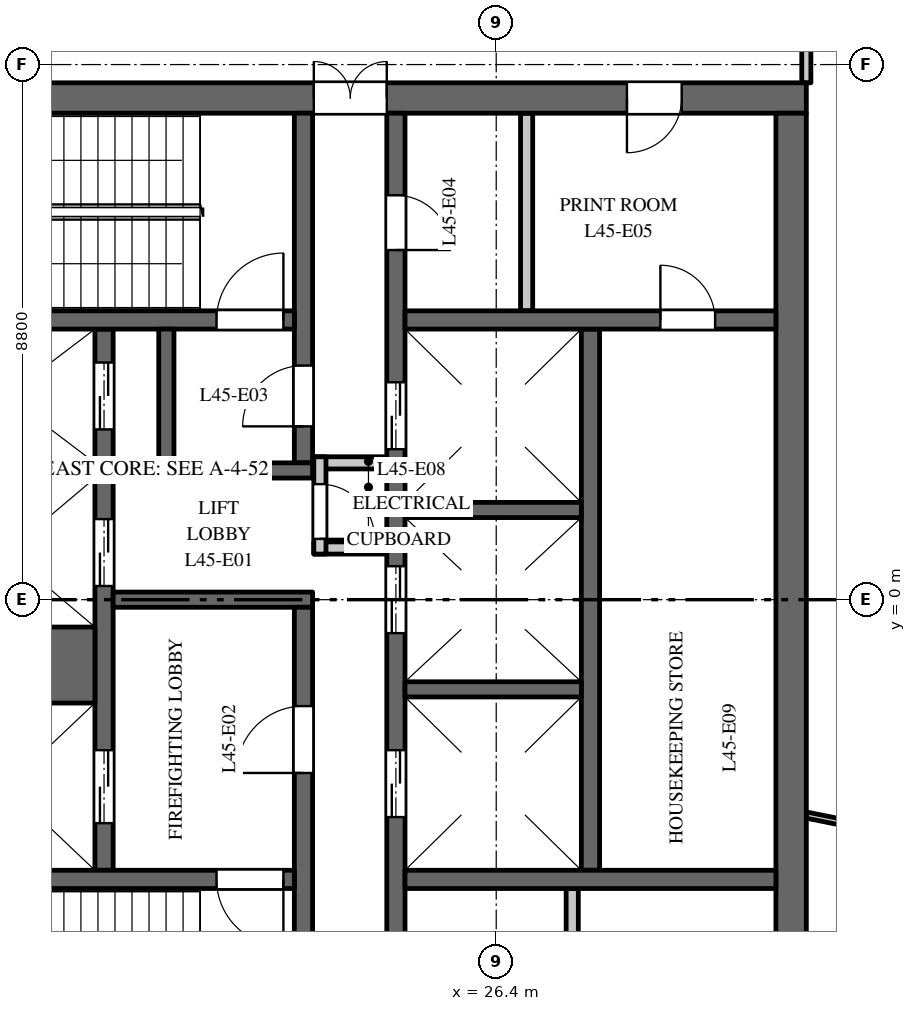
"""IFC4 building model, lengths in metres.
Left out: names, types, materials, properties, quantities, classifications, styles, units other than length and angle.
Written with IfcOpenShell. Run it as: python <this file> out.ifc"""

import sys

from ifc_helpers import new_model, si_unit, direction, frame, frame_2d, origin, place, context, subcontext, project, spatial, rectangle, extrude, element, fill, save


model = new_model("IFC4")
c1 = context("Model", 3, precision=1e-05, world=origin(), true_north=direction((0.0, 1.0)))
c2 = subcontext(c1, "Body", "Model", "MODEL_VIEW")
j1 = project(units=[si_unit("LENGTHUNIT", "METRE"), si_unit("PLANEANGLEUNIT", "RADIAN")], contexts=[c1])
p1 = place(None, origin())
s1 = spatial("IfcSite", under=j1, at=p1, CompositionType="ELEMENT")
p2 = place(p1, origin())
s2 = spatial("IfcBuilding", under=s1, at=p2, CompositionType="ELEMENT")
p3 = place(p2, frame((0.0, 0.0, 194.0)))
s3 = spatial("IfcBuildingStorey", under=s2, at=p3, CompositionType="ELEMENT", Elevation=194.0)
p4 = place(p3, frame((16.5, 8.25, 0.0), z_axis=(0.0, 0.0, 1.0), x_axis=(1.0, 0.0, 0.0)))
e1 = element("IfcWall", 1, at=p4, inside=s3, PredefinedType="SHEAR", context=c2, shape_type="SweptSolid", body=[
    extrude(rectangle(XDim=15.0, YDim=0.5, at=frame_2d((7.5, 0.0))), origin(), (0.0, 0.0, 1.0), 3.7),
])
p5 = place(p4, frame((6.9, 0.0, 0.0)))
e2 = element("IfcOpeningElement", 2, at=p5, cuts=e1, PredefinedType="OPENING", context=c2, shape_type="SweptSolid", body=[
    extrude(rectangle(XDim=1.2, YDim=2.1, at=frame_2d((0.6, 1.05))), frame((0.0, 0.26, 0.0), z_axis=(0.0, -1.0, 0.0), x_axis=(1.0, 0.0, 0.0)), (0.0, 0.0, 1.0), 0.52),
])
p6 = place(p4, frame((12.05, 0.0, 0.0)))
e3 = element("IfcOpeningElement", 3, at=p6, cuts=e1, PredefinedType="OPENING", context=c2, shape_type="SweptSolid", body=[
    extrude(rectangle(XDim=0.9, YDim=2.1, at=frame_2d((0.45, 1.05))), frame((0.0, 0.26, 0.0), z_axis=(0.0, -1.0, 0.0), x_axis=(1.0, 0.0, 0.0)), (0.0, 0.0, 1.0), 0.52),
])
p7 = place(p3, frame((27.95, -4.45, 0.0), z_axis=(0.0, 0.0, 1.0), x_axis=(0.0, 1.0, 0.0)))
e4 = element("IfcWall", 4, at=p7, inside=s3, PredefinedType="SHEAR", context=c2, shape_type="SweptSolid", body=[
    extrude(rectangle(XDim=8.9, YDim=0.3, at=frame_2d((4.45, 0.0))), origin(), (0.0, 0.0, 1.0), 3.7),
])
p8 = place(p3, frame((19.95, -4.45, 0.0), z_axis=(0.0, 0.0, 1.0), x_axis=(0.0, 1.0, 0.0)))
e5 = element("IfcWall", 5, at=p8, inside=s3, PredefinedType="SHEAR", context=c2, shape_type="SweptSolid", body=[
    extrude(rectangle(XDim=8.9, YDim=0.3, at=frame_2d((4.45, 0.0))), origin(), (0.0, 0.0, 1.0), 3.7),
])
p9 = place(p8, frame((0.775, 0.0, 0.0)))
e6 = element("IfcOpeningElement", 6, at=p9, cuts=e5, PredefinedType="OPENING", context=c2, shape_type="SweptSolid", body=[
    extrude(rectangle(XDim=1.2, YDim=2.1, at=frame_2d((0.6, 1.05))), frame((0.0, 0.16, 0.0), z_axis=(0.0, -1.0, 0.0), x_axis=(1.0, 0.0, 0.0)), (0.0, 0.0, 1.0), 0.32),
])
p10 = place(p8, frame((4.675, 0.0, 0.0)))
e7 = element("IfcOpeningElement", 7, at=p10, cuts=e5, PredefinedType="OPENING", context=c2, shape_type="SweptSolid", body=[
    extrude(rectangle(XDim=1.1, YDim=2.1, at=frame_2d((0.55, 1.05))), frame((0.0, 0.16, 0.0), z_axis=(0.0, -1.0, 0.0), x_axis=(1.0, 0.0, 0.0)), (0.0, 0.0, 1.0), 0.32),
])
p11 = place(p8, frame((7.25, 0.0, 0.0)))
e8 = element("IfcOpeningElement", 8, at=p11, cuts=e5, PredefinedType="OPENING", context=c2, shape_type="SweptSolid", body=[
    extrude(rectangle(XDim=1.1, YDim=2.1, at=frame_2d((0.55, 1.05))), frame((0.0, 0.16, 0.0), z_axis=(0.0, -1.0, 0.0), x_axis=(1.0, 0.0, 0.0)), (0.0, 0.0, 1.0), 0.32),
])
p12 = place(p3, frame((24.75, -8.0, 0.0), z_axis=(0.0, 0.0, 1.0), x_axis=(0.0, 1.0, 0.0)))
e9 = element("IfcWall", 9, at=p12, inside=s3, PredefinedType="SHEAR", context=c2, shape_type="SweptSolid", body=[
    extrude(rectangle(XDim=16.0, YDim=0.3, at=frame_2d((8.0, 0.0))), origin(), (0.0, 0.0, 1.0), 3.7),
])
p13 = place(p12, frame((4.425, 0.0, 0.0)))
e10 = element("IfcOpeningElement", 10, at=p13, cuts=e9, PredefinedType="OPENING", context=c2, shape_type="SweptSolid", body=[
    extrude(rectangle(XDim=1.1, YDim=2.1, at=frame_2d((0.55, 1.05))), frame((0.0, 0.16, 0.0), z_axis=(0.0, -1.0, 0.0), x_axis=(1.0, 0.0, 0.0)), (0.0, 0.0, 1.0), 0.32),
])
p14 = place(p12, frame((7.45, 0.0, 0.0)))
e11 = element("IfcOpeningElement", 11, at=p14, cuts=e9, PredefinedType="OPENING", context=c2, shape_type="SweptSolid", body=[
    extrude(rectangle(XDim=1.1, YDim=2.1, at=frame_2d((0.55, 1.05))), frame((0.0, 0.16, 0.0), z_axis=(0.0, -1.0, 0.0), x_axis=(1.0, 0.0, 0.0)), (0.0, 0.0, 1.0), 0.32),
])
p15 = place(p12, frame((10.475, 0.0, 0.0)))
e12 = element("IfcOpeningElement", 12, at=p15, cuts=e9, PredefinedType="OPENING", context=c2, shape_type="SweptSolid", body=[
    extrude(rectangle(XDim=1.1, YDim=2.1, at=frame_2d((0.55, 1.05))), frame((0.0, 0.16, 0.0), z_axis=(0.0, -1.0, 0.0), x_axis=(1.0, 0.0, 0.0)), (0.0, 0.0, 1.0), 0.32),
])
p16 = place(p12, frame((13.75, 0.0, 0.0)))
e13 = element("IfcOpeningElement", 13, at=p16, cuts=e9, PredefinedType="OPENING", context=c2, shape_type="SweptSolid", body=[
    extrude(rectangle(XDim=0.9, YDim=2.1, at=frame_2d((0.45, 1.05))), frame((0.0, 0.16, 0.0), z_axis=(0.0, -1.0, 0.0), x_axis=(1.0, 0.0, 0.0)), (0.0, 0.0, 1.0), 0.32),
])
p17 = place(p12, frame((1.35, 0.0, 0.0)))
e14 = element("IfcOpeningElement", 14, at=p17, cuts=e9, PredefinedType="OPENING", context=c2, shape_type="SweptSolid", body=[
    extrude(rectangle(XDim=0.9, YDim=2.1, at=frame_2d((0.45, 1.05))), frame((0.0, 0.16, 0.0), z_axis=(0.0, -1.0, 0.0), x_axis=(1.0, 0.0, 0.0)), (0.0, 0.0, 1.0), 0.32),
])
p18 = place(p3, frame((20.1, 0.0, 0.0), z_axis=(0.0, 0.0, 1.0), x_axis=(1.0, 0.0, 0.0)))
e15 = element("IfcWall", 15, at=p18, inside=s3, PredefinedType="SHEAR", context=c2, shape_type="SweptSolid", body=[
    extrude(rectangle(XDim=3.28, YDim=0.25, at=frame_2d((1.64, 0.0))), origin(), (0.0, 0.0, 1.0), 3.7),
])
for number, where, z_axis, x_axis in (
    (16, (23.4, 0.85, 0.0), (0.0, 0.0, 1.0), (1.0, 0.0, 0.0)),
    (17, (23.4, 2.25, 0.0), (0.0, 0.0, 1.0), (1.0, 0.0, 0.0)),
):
    element("IfcWall", number, at=place(p3, frame(where, z_axis=z_axis, x_axis=x_axis)), inside=s3, PredefinedType="PARTITIONING", context=c2, shape_type="SweptSolid", body=[
        extrude(rectangle(XDim=1.2, YDim=0.2, at=frame_2d((0.6, 0.0))), origin(), (0.0, 0.0, 1.0), 3.7),
    ])
p19 = place(p3, frame((23.5, 0.75, 0.0), z_axis=(0.0, 0.0, 1.0), x_axis=(0.0, 1.0, 0.0)))
e18 = element("IfcWall", 18, at=p19, inside=s3, PredefinedType="PARTITIONING", context=c2, shape_type="SweptSolid", body=[
    extrude(rectangle(XDim=1.6, YDim=0.2, at=frame_2d((0.8, 0.0))), origin(), (0.0, 0.0, 1.0), 3.7),
])
p20 = place(p19, frame((0.25, 0.0, 0.0)))
e19 = element("IfcOpeningElement", 19, at=p20, cuts=e18, PredefinedType="OPENING", context=c2, shape_type="SweptSolid", body=[
    extrude(rectangle(XDim=0.9, YDim=2.1, at=frame_2d((0.45, 1.05))), frame((0.0, 0.11, 0.0), z_axis=(0.0, -1.0, 0.0), x_axis=(1.0, 0.0, 0.0)), (0.0, 0.0, 1.0), 0.22),
])
p21 = place(p3, frame((31.25, -8.0, 0.0), z_axis=(0.0, 0.0, 1.0), x_axis=(0.0, 1.0, 0.0)))
e20 = element("IfcWall", 20, at=p21, inside=s3, PredefinedType="SHEAR", context=c2, shape_type="SweptSolid", body=[
    extrude(rectangle(XDim=16.0, YDim=0.5, at=frame_2d((8.0, 0.0))), origin(), (0.0, 0.0, 1.0), 3.7),
])
p22 = place(p3, frame((24.9, 4.6, 0.0), z_axis=(0.0, 0.0, 1.0), x_axis=(1.0, 0.0, 0.0)))
e21 = element("IfcWall", 21, at=p22, inside=s3, PredefinedType="SHEAR", context=c2, shape_type="SweptSolid", body=[
    extrude(rectangle(XDim=6.1, YDim=0.3, at=frame_2d((3.05, 0.0))), origin(), (0.0, 0.0, 1.0), 3.7),
])
p23 = place(p22, frame((4.2, 0.0, 0.0)))
e22 = element("IfcOpeningElement", 22, at=p23, cuts=e21, PredefinedType="OPENING", context=c2, shape_type="SweptSolid", body=[
    extrude(rectangle(XDim=0.9, YDim=2.1, at=frame_2d((0.45, 1.05))), frame((0.0, 0.16, 0.0), z_axis=(0.0, -1.0, 0.0), x_axis=(1.0, 0.0, 0.0)), (0.0, 0.0, 1.0), 0.32),
])
for number, where, z_axis, x_axis in (
    (23, (26.9, 4.75, 0.0), (0.0, 0.0, 1.0), (0.0, 1.0, 0.0)),
    (24, (27.65, -8.0, 0.0), (0.0, 0.0, 1.0), (0.0, 1.0, 0.0)),
):
    element("IfcWall", number, at=place(p3, frame(where, z_axis=z_axis, x_axis=x_axis)), inside=s3, PredefinedType="PARTITIONING", context=c2, shape_type="SweptSolid", body=[
        extrude(rectangle(XDim=3.25, YDim=0.2, at=frame_2d((1.625, 0.0))), origin(), (0.0, 0.0, 1.0), 3.7),
    ])
p24 = place(p3, frame((24.9, -4.6, 0.0), z_axis=(0.0, 0.0, 1.0), x_axis=(1.0, 0.0, 0.0)))
e25 = element("IfcWall", 25, at=p24, inside=s3, PredefinedType="SHEAR", context=c2, shape_type="SweptSolid", body=[
    extrude(rectangle(XDim=6.1, YDim=0.3, at=frame_2d((3.05, 0.0))), origin(), (0.0, 0.0, 1.0), 3.7),
])
p25 = place(p3, frame((16.9, -1.075, 0.0), z_axis=(0.0, 0.0, 1.0), x_axis=(1.0, 0.0, 0.0)))
e26 = element("IfcWall", 26, at=p25, inside=s3, PredefinedType="SHEAR", context=c2, shape_type="SweptSolid", body=[
    extrude(rectangle(XDim=2.9, YDim=1.25, at=frame_2d((1.45, 0.0))), origin(), (0.0, 0.0, 1.0), 3.7),
])
for number, where, z_axis, x_axis in (
    (27, (16.9, 2.125, 0.0), (0.0, 0.0, 1.0), (1.0, 0.0, 0.0)),
    (28, (24.9, -1.475, 0.0), (0.0, 0.0, 1.0), (1.0, 0.0, 0.0)),
    (29, (24.9, 1.475, 0.0), (0.0, 0.0, 1.0), (1.0, 0.0, 0.0)),
):
    element("IfcWall", number, at=place(p3, frame(where, z_axis=z_axis, x_axis=x_axis)), inside=s3, PredefinedType="SHEAR", context=c2, shape_type="SweptSolid", body=[
        extrude(rectangle(XDim=2.9, YDim=0.25, at=frame_2d((1.45, 0.0))), origin(), (0.0, 0.0, 1.0), 3.7),
    ])
p26 = place(p3, frame((23.23, 2.25, 0.0), z_axis=(0.0, 0.0, 1.0), x_axis=(0.0, 1.0, 0.0)))
e30 = element("IfcWall", 30, at=p26, inside=s3, PredefinedType="SHEAR", context=c2, shape_type="SweptSolid", body=[
    extrude(rectangle(XDim=5.75, YDim=0.3, at=frame_2d((2.875, 0.0))), origin(), (0.0, 0.0, 1.0), 3.7),
])
p27 = place(p26, frame((0.6, 0.0, 0.0)))
e31 = element("IfcOpeningElement", 31, at=p27, cuts=e30, PredefinedType="OPENING", context=c2, shape_type="SweptSolid", body=[
    extrude(rectangle(XDim=1.0, YDim=2.1, at=frame_2d((0.5, 1.05))), frame((0.0, 0.16, 0.0), z_axis=(0.0, -1.0, 0.0), x_axis=(1.0, 0.0, 0.0)), (0.0, 0.0, 1.0), 0.32),
])
p28 = place(p3, frame((23.23, -8.0, 0.0), z_axis=(0.0, 0.0, 1.0), x_axis=(0.0, 1.0, 0.0)))
e32 = element("IfcWall", 32, at=p28, inside=s3, PredefinedType="SHEAR", context=c2, shape_type="SweptSolid", body=[
    extrude(rectangle(XDim=7.875, YDim=0.3, at=frame_2d((3.938, 0.0))), origin(), (0.0, 0.0, 1.0), 3.7),
])
p29 = place(p28, frame((5.15, 0.0, 0.0)))
e33 = element("IfcOpeningElement", 33, at=p29, cuts=e32, PredefinedType="OPENING", context=c2, shape_type="SweptSolid", body=[
    extrude(rectangle(XDim=1.1, YDim=2.1, at=frame_2d((0.55, 1.05))), frame((0.0, 0.16, 0.0), z_axis=(0.0, -1.0, 0.0), x_axis=(1.0, 0.0, 0.0)), (0.0, 0.0, 1.0), 0.32),
])
p30 = place(p3, frame((16.9, 4.6, 0.0), z_axis=(0.0, 0.0, 1.0), x_axis=(1.0, 0.0, 0.0)))
e34 = element("IfcWall", 34, at=p30, inside=s3, PredefinedType="SHEAR", context=c2, shape_type="SweptSolid", body=[
    extrude(rectangle(XDim=6.18, YDim=0.3, at=frame_2d((3.09, 0.0))), origin(), (0.0, 0.0, 1.0), 3.7),
])
p31 = place(p30, frame((4.9, 0.0, 0.0)))
e35 = element("IfcOpeningElement", 35, at=p31, cuts=e34, PredefinedType="OPENING", context=c2, shape_type="SweptSolid", body=[
    extrude(rectangle(XDim=1.1, YDim=2.1, at=frame_2d((0.55, 1.05))), frame((0.0, 0.16, 0.0), z_axis=(0.0, -1.0, 0.0), x_axis=(1.0, 0.0, 0.0)), (0.0, 0.0, 1.0), 0.32),
])
p32 = place(p3, frame((16.9, -4.6, 0.0), z_axis=(0.0, 0.0, 1.0), x_axis=(1.0, 0.0, 0.0)))
e36 = element("IfcWall", 36, at=p32, inside=s3, PredefinedType="SHEAR", context=c2, shape_type="SweptSolid", body=[
    extrude(rectangle(XDim=6.18, YDim=0.3, at=frame_2d((3.09, 0.0))), origin(), (0.0, 0.0, 1.0), 3.7),
])
p33 = place(p32, frame((4.9, 0.0, 0.0)))
e37 = element("IfcOpeningElement", 37, at=p33, cuts=e36, PredefinedType="OPENING", context=c2, shape_type="SweptSolid", body=[
    extrude(rectangle(XDim=1.1, YDim=2.1, at=frame_2d((0.55, 1.05))), frame((0.0, 0.16, 0.0), z_axis=(0.0, -1.0, 0.0), x_axis=(1.0, 0.0, 0.0)), (0.0, 0.0, 1.0), 0.32),
])
p34 = place(p3, frame((20.85, 2.125, 0.0), z_axis=(0.0, 0.0, 1.0), x_axis=(1.0, 0.0, 0.0)))
e38 = element("IfcWall", 38, at=p34, inside=s3, PredefinedType="SHEAR", context=c2, shape_type="SweptSolid", body=[
    extrude(rectangle(XDim=2.53, YDim=0.25, at=frame_2d((1.265, 0.0))), origin(), (0.0, 0.0, 1.0), 3.7),
])
p35 = place(p3, frame((20.975, 2.25, 0.0), z_axis=(0.0, 0.0, 1.0), x_axis=(0.0, 1.0, 0.0)))
e39 = element("IfcWall", 39, at=p35, inside=s3, PredefinedType="SHEAR", context=c2, shape_type="SweptSolid", body=[
    extrude(rectangle(XDim=2.2, YDim=0.25, at=frame_2d((1.1, 0.0))), origin(), (0.0, 0.0, 1.0), 3.7),
])
p36 = place(p3, frame((31.5, -3.542, 0.0), z_axis=(0.0, 0.0, 1.0), x_axis=(0.980357474535, -0.197228857227, 0.0)))
e40 = element("IfcWall", 40, at=p36, inside=s3, PredefinedType="PARTITIONING", context=c2, shape_type="SweptSolid", body=[
    extrude(rectangle(XDim=4.092, YDim=0.1, at=frame_2d((2.046, 0.0))), origin(), (0.0, 0.0, 1.0), 2.9),
])
p37 = place(p3, frame((31.5, 8.5, 0.0), z_axis=(0.0, 0.0, 1.0), x_axis=(0.0, 1.0, 0.0)))
e41 = element("IfcWall", 41, at=p37, inside=s3, PredefinedType="PARTITIONING", context=c2, shape_type="SweptSolid", body=[
    extrude(rectangle(XDim=2.2, YDim=0.15, at=frame_2d((1.1, 0.0))), origin(), (0.0, 0.0, 1.0), 2.9),
])
p38 = place(p37, frame((0.65, 0.0, 0.0)))
e42 = element("IfcOpeningElement", 42, at=p38, cuts=e41, PredefinedType="OPENING", context=c2, shape_type="SweptSolid", body=[
    extrude(rectangle(XDim=1.0, YDim=2.1, at=frame_2d((0.5, 1.05))), frame((0.0, 0.085, 0.0), z_axis=(0.0, -1.0, 0.0), x_axis=(1.0, 0.0, 0.0)), (0.0, 0.0, 1.0), 0.17),
])
p39 = place(p9, origin())
e43 = element("IfcDoor", 43, at=p39, inside=s3, OperationType="DOUBLE_DOOR_SLIDING", PredefinedType="DOOR", context=c2, shape_type="SweptSolid", body=[
    extrude(rectangle(XDim=1.2, YDim=2.1, at=frame_2d((0.6, 1.05))), frame((0.0, 0.025, 0.0), z_axis=(0.0, -1.0, 0.0), x_axis=(1.0, 0.0, 0.0)), (0.0, 0.0, 1.0), 0.05),
])
fill(e6, e43)
p40 = place(p10, origin())
e44 = element("IfcDoor", 44, at=p40, inside=s3, OperationType="DOUBLE_DOOR_SLIDING", PredefinedType="DOOR", context=c2, shape_type="SweptSolid", body=[
    extrude(rectangle(XDim=1.1, YDim=2.1, at=frame_2d((0.55, 1.05))), frame((0.0, 0.025, 0.0), z_axis=(0.0, -1.0, 0.0), x_axis=(1.0, 0.0, 0.0)), (0.0, 0.0, 1.0), 0.05),
])
fill(e7, e44)
p41 = place(p11, origin())
e45 = element("IfcDoor", 45, at=p41, inside=s3, OperationType="DOUBLE_DOOR_SLIDING", PredefinedType="DOOR", context=c2, shape_type="SweptSolid", body=[
    extrude(rectangle(XDim=1.1, YDim=2.1, at=frame_2d((0.55, 1.05))), frame((0.0, 0.025, 0.0), z_axis=(0.0, -1.0, 0.0), x_axis=(1.0, 0.0, 0.0)), (0.0, 0.0, 1.0), 0.05),
])
fill(e8, e45)
p42 = place(p13, origin())
e46 = element("IfcDoor", 46, at=p42, inside=s3, OperationType="DOUBLE_DOOR_SLIDING", PredefinedType="DOOR", context=c2, shape_type="SweptSolid", body=[
    extrude(rectangle(XDim=1.1, YDim=2.1, at=frame_2d((0.55, 1.05))), frame((0.0, 0.025, 0.0), z_axis=(0.0, -1.0, 0.0), x_axis=(1.0, 0.0, 0.0)), (0.0, 0.0, 1.0), 0.05),
])
fill(e10, e46)
p43 = place(p14, origin())
e47 = element("IfcDoor", 47, at=p43, inside=s3, OperationType="DOUBLE_DOOR_SLIDING", PredefinedType="DOOR", context=c2, shape_type="SweptSolid", body=[
    extrude(rectangle(XDim=1.1, YDim=2.1, at=frame_2d((0.55, 1.05))), frame((0.0, 0.025, 0.0), z_axis=(0.0, -1.0, 0.0), x_axis=(1.0, 0.0, 0.0)), (0.0, 0.0, 1.0), 0.05),
])
fill(e11, e47)
p44 = place(p15, origin())
e48 = element("IfcDoor", 48, at=p44, inside=s3, OperationType="DOUBLE_DOOR_SLIDING", PredefinedType="DOOR", context=c2, shape_type="SweptSolid", body=[
    extrude(rectangle(XDim=1.1, YDim=2.1, at=frame_2d((0.55, 1.05))), frame((0.0, 0.025, 0.0), z_axis=(0.0, -1.0, 0.0), x_axis=(1.0, 0.0, 0.0)), (0.0, 0.0, 1.0), 0.05),
])
fill(e12, e48)
p45 = place(p31, origin())
e49 = element("IfcDoor", 49, at=p45, inside=s3, OperationType="SINGLE_SWING_LEFT", PredefinedType="DOOR", context=c2, shape_type="SweptSolid", body=[
    extrude(rectangle(XDim=1.1, YDim=2.1, at=frame_2d((0.55, 1.05))), frame((0.0, 0.025, 0.0), z_axis=(0.0, -1.0, 0.0), x_axis=(1.0, 0.0, 0.0)), (0.0, 0.0, 1.0), 0.05),
])
fill(e35, e49)
p46 = place(p33, origin())
e50 = element("IfcDoor", 50, at=p46, inside=s3, OperationType="SINGLE_SWING_RIGHT", PredefinedType="DOOR", context=c2, shape_type="SweptSolid", body=[
    extrude(rectangle(XDim=1.1, YDim=2.1, at=frame_2d((0.55, 1.05))), frame((0.0, 0.025, 0.0), z_axis=(0.0, -1.0, 0.0), x_axis=(1.0, 0.0, 0.0)), (0.0, 0.0, 1.0), 0.05),
])
fill(e37, e50)
p47 = place(p29, origin())
e51 = element("IfcDoor", 51, at=p47, inside=s3, OperationType="SINGLE_SWING_RIGHT", PredefinedType="DOOR", context=c2, shape_type="SweptSolid", body=[
    extrude(rectangle(XDim=1.1, YDim=2.1, at=frame_2d((0.55, 1.05))), frame((0.0, 0.025, 0.0), z_axis=(0.0, -1.0, 0.0), x_axis=(1.0, 0.0, 0.0)), (0.0, 0.0, 1.0), 0.05),
])
fill(e33, e51)
p48 = place(p27, origin())
e52 = element("IfcDoor", 52, at=p48, inside=s3, OperationType="SINGLE_SWING_RIGHT", PredefinedType="DOOR", context=c2, shape_type="SweptSolid", body=[
    extrude(rectangle(XDim=1.0, YDim=2.1, at=frame_2d((0.5, 1.05))), frame((0.0, 0.025, 0.0), z_axis=(0.0, -1.0, 0.0), x_axis=(1.0, 0.0, 0.0)), (0.0, 0.0, 1.0), 0.05),
])
fill(e31, e52)
p49 = place(p5, origin())
e53 = element("IfcDoor", 53, at=p49, inside=s3, OperationType="DOUBLE_DOOR_DOUBLE_SWING", PredefinedType="DOOR", context=c2, shape_type="SweptSolid", body=[
    extrude(rectangle(XDim=1.2, YDim=2.1, at=frame_2d((0.6, 1.05))), frame((0.0, 0.025, 0.0), z_axis=(0.0, -1.0, 0.0), x_axis=(1.0, 0.0, 0.0)), (0.0, 0.0, 1.0), 0.05),
])
fill(e2, e53)
p50 = place(p16, origin())
e54 = element("IfcDoor", 54, at=p50, inside=s3, OperationType="SINGLE_SWING_LEFT", PredefinedType="DOOR", context=c2, shape_type="SweptSolid", body=[
    extrude(rectangle(XDim=0.9, YDim=2.1, at=frame_2d((0.45, 1.05))), frame((0.0, 0.025, 0.0), z_axis=(0.0, -1.0, 0.0), x_axis=(1.0, 0.0, 0.0)), (0.0, 0.0, 1.0), 0.05),
])
fill(e13, e54)
p51 = place(p6, origin())
e55 = element("IfcDoor", 55, at=p51, inside=s3, OperationType="SINGLE_SWING_LEFT", PredefinedType="DOOR", context=c2, shape_type="SweptSolid", body=[
    extrude(rectangle(XDim=0.9, YDim=2.1, at=frame_2d((0.45, 1.05))), frame((0.0, 0.025, 0.0), z_axis=(0.0, -1.0, 0.0), x_axis=(1.0, 0.0, 0.0)), (0.0, 0.0, 1.0), 0.05),
])
fill(e3, e55)
p52 = place(p20, origin())
e56 = element("IfcDoor", 56, at=p52, inside=s3, OperationType="SINGLE_SWING_LEFT", PredefinedType="DOOR", context=c2, shape_type="SweptSolid", body=[
    extrude(rectangle(XDim=0.9, YDim=2.1, at=frame_2d((0.45, 1.05))), frame((0.0, 0.025, 0.0), z_axis=(0.0, -1.0, 0.0), x_axis=(1.0, 0.0, 0.0)), (0.0, 0.0, 1.0), 0.05),
])
fill(e19, e56)
p53 = place(p23, origin())
e57 = element("IfcDoor", 57, at=p53, inside=s3, OperationType="SINGLE_SWING_RIGHT", PredefinedType="DOOR", context=c2, shape_type="SweptSolid", body=[
    extrude(rectangle(XDim=0.9, YDim=2.1, at=frame_2d((0.45, 1.05))), frame((0.0, 0.025, 0.0), z_axis=(0.0, -1.0, 0.0), x_axis=(1.0, 0.0, 0.0)), (0.0, 0.0, 1.0), 0.05),
])
fill(e22, e57)
save(model, sys.argv[1])
